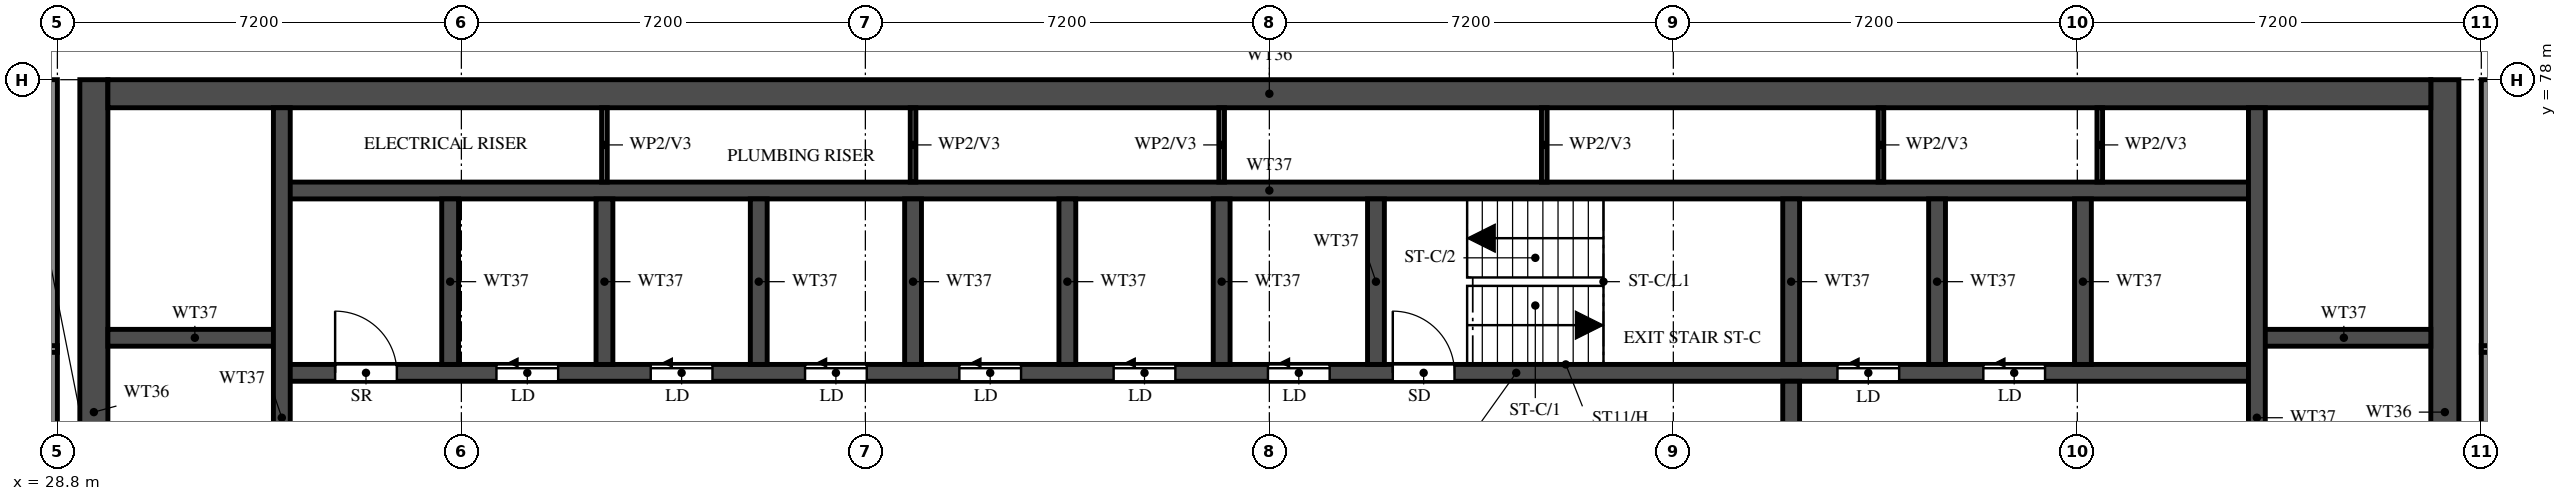
"""IFC4 building model, lengths in metres.
Left out: names, types, materials, properties, quantities, classifications, styles, units other than length and angle.
Written with IfcOpenShell. Run it as: python <this file> out.ifc"""

import sys

from ifc_helpers import new_model, si_unit, direction, frame, frame_2d, origin, place, context, subcontext, project, spatial, rectangle, extrude, element, fill, save


model = new_model("IFC4")
c1 = context("Model", 3, precision=1e-05, world=origin(), true_north=direction((0.0, 1.0)))
c2 = subcontext(c1, "Body", "Model", "MODEL_VIEW")
j1 = project(units=[si_unit("LENGTHUNIT", "METRE"), si_unit("PLANEANGLEUNIT", "RADIAN")], contexts=[c1])
p1 = place(None, origin())
s1 = spatial("IfcSite", under=j1, at=p1, CompositionType="ELEMENT")
p2 = place(p1, origin())
s2 = spatial("IfcBuilding", under=s1, at=p2, CompositionType="ELEMENT")
p3 = place(p2, frame((0.0, 0.0, 260.5)))
s3 = spatial("IfcBuildingStorey", under=s2, at=p3, CompositionType="ELEMENT", Elevation=260.5)
for number, where, z_axis, x_axis in (
    (1, (29.45, 66.15, 0.0), (0.0, 0.0, 1.0), (0.0, 1.0, 0.0)),
    (2, (71.35, 66.15, 0.0), (0.0, 0.0, 1.0), (0.0, 1.0, 0.0)),
):
    element("IfcWall", number, at=place(p3, frame(where, z_axis=z_axis, x_axis=x_axis)), inside=s3, PredefinedType="SHEAR", context=c2, shape_type="SweptSolid", body=[
        extrude(rectangle(XDim=11.85, YDim=0.5, at=frame_2d((5.925, 0.0))), origin(), (0.0, 0.0, 1.0), 3.22),
    ])
p4 = place(p3, frame((29.7, 77.75, 0.0), z_axis=(0.0, 0.0, 1.0), x_axis=(1.0, 0.0, 0.0)))
e3 = element("IfcWall", 3, at=p4, inside=s3, PredefinedType="SHEAR", context=c2, shape_type="SweptSolid", body=[
    extrude(rectangle(XDim=41.4, YDim=0.5, at=frame_2d((20.7, 0.0))), origin(), (0.0, 0.0, 1.0), 3.22),
])
p5 = place(p3, frame((32.8, 72.775, 0.0), z_axis=(0.0, 0.0, 1.0), x_axis=(1.0, 0.0, 0.0)))
e4 = element("IfcWall", 4, at=p5, inside=s3, PredefinedType="SHEAR", context=c2, shape_type="SweptSolid", body=[
    extrude(rectangle(XDim=35.2, YDim=0.3, at=frame_2d((17.6, 0.0))), origin(), (0.0, 0.0, 1.0), 3.22),
])
p6 = place(p5, frame((19.8, 0.0, 0.0)))
e5 = element("IfcOpeningElement", 5, at=p6, cuts=e4, PredefinedType="OPENING", context=c2, shape_type="SweptSolid", body=[
    extrude(rectangle(XDim=1.1, YDim=2.1, at=frame_2d((0.55, 1.05))), frame((0.0, 0.16, 0.0), z_axis=(0.0, -1.0, 0.0), x_axis=(1.0, 0.0, 0.0)), (0.0, 0.0, 1.0), 0.32),
])
p7 = place(p5, frame((27.725, 0.0, 0.0)))
e6 = element("IfcOpeningElement", 6, at=p7, cuts=e4, PredefinedType="OPENING", context=c2, shape_type="SweptSolid", body=[
    extrude(rectangle(XDim=1.1, YDim=2.1, at=frame_2d((0.55, 1.05))), frame((0.0, 0.16, 0.0), z_axis=(0.0, -1.0, 0.0), x_axis=(1.0, 0.0, 0.0)), (0.0, 0.0, 1.0), 0.32),
])
p8 = place(p5, frame((30.325, 0.0, 0.0)))
e7 = element("IfcOpeningElement", 7, at=p8, cuts=e4, PredefinedType="OPENING", context=c2, shape_type="SweptSolid", body=[
    extrude(rectangle(XDim=1.1, YDim=2.1, at=frame_2d((0.55, 1.05))), frame((0.0, 0.16, 0.0), z_axis=(0.0, -1.0, 0.0), x_axis=(1.0, 0.0, 0.0)), (0.0, 0.0, 1.0), 0.32),
])
p9 = place(p5, frame((3.825, 0.0, 0.0)))
e8 = element("IfcOpeningElement", 8, at=p9, cuts=e4, PredefinedType="OPENING", context=c2, shape_type="SweptSolid", body=[
    extrude(rectangle(XDim=1.1, YDim=2.1, at=frame_2d((0.55, 1.05))), frame((0.0, 0.16, 0.0), z_axis=(0.0, -1.0, 0.0), x_axis=(1.0, 0.0, 0.0)), (0.0, 0.0, 1.0), 0.32),
])
p10 = place(p5, frame((6.575, 0.0, 0.0)))
e9 = element("IfcOpeningElement", 9, at=p10, cuts=e4, PredefinedType="OPENING", context=c2, shape_type="SweptSolid", body=[
    extrude(rectangle(XDim=1.1, YDim=2.1, at=frame_2d((0.55, 1.05))), frame((0.0, 0.16, 0.0), z_axis=(0.0, -1.0, 0.0), x_axis=(1.0, 0.0, 0.0)), (0.0, 0.0, 1.0), 0.32),
])
p11 = place(p5, frame((9.325, 0.0, 0.0)))
e10 = element("IfcOpeningElement", 10, at=p11, cuts=e4, PredefinedType="OPENING", context=c2, shape_type="SweptSolid", body=[
    extrude(rectangle(XDim=1.1, YDim=2.1, at=frame_2d((0.55, 1.05))), frame((0.0, 0.16, 0.0), z_axis=(0.0, -1.0, 0.0), x_axis=(1.0, 0.0, 0.0)), (0.0, 0.0, 1.0), 0.32),
])
p12 = place(p5, frame((12.075, 0.0, 0.0)))
e11 = element("IfcOpeningElement", 11, at=p12, cuts=e4, PredefinedType="OPENING", context=c2, shape_type="SweptSolid", body=[
    extrude(rectangle(XDim=1.1, YDim=2.1, at=frame_2d((0.55, 1.05))), frame((0.0, 0.16, 0.0), z_axis=(0.0, -1.0, 0.0), x_axis=(1.0, 0.0, 0.0)), (0.0, 0.0, 1.0), 0.32),
])
p13 = place(p5, frame((14.825, 0.0, 0.0)))
e12 = element("IfcOpeningElement", 12, at=p13, cuts=e4, PredefinedType="OPENING", context=c2, shape_type="SweptSolid", body=[
    extrude(rectangle(XDim=1.1, YDim=2.1, at=frame_2d((0.55, 1.05))), frame((0.0, 0.16, 0.0), z_axis=(0.0, -1.0, 0.0), x_axis=(1.0, 0.0, 0.0)), (0.0, 0.0, 1.0), 0.32),
])
p14 = place(p5, frame((17.575, 0.0, 0.0)))
e13 = element("IfcOpeningElement", 13, at=p14, cuts=e4, PredefinedType="OPENING", context=c2, shape_type="SweptSolid", body=[
    extrude(rectangle(XDim=1.1, YDim=2.1, at=frame_2d((0.55, 1.05))), frame((0.0, 0.16, 0.0), z_axis=(0.0, -1.0, 0.0), x_axis=(1.0, 0.0, 0.0)), (0.0, 0.0, 1.0), 0.32),
])
p15 = place(p5, frame((0.95, 0.0, 0.0)))
e14 = element("IfcOpeningElement", 14, at=p15, cuts=e4, PredefinedType="OPENING", context=c2, shape_type="SweptSolid", body=[
    extrude(rectangle(XDim=1.1, YDim=2.1, at=frame_2d((0.55, 1.05))), frame((0.0, 0.16, 0.0), z_axis=(0.0, -1.0, 0.0), x_axis=(1.0, 0.0, 0.0)), (0.0, 0.0, 1.0), 0.32),
])
p16 = place(p3, frame((32.8, 76.025, 0.0), z_axis=(0.0, 0.0, 1.0), x_axis=(1.0, 0.0, 0.0)))
e15 = element("IfcWall", 15, at=p16, inside=s3, PredefinedType="SHEAR", context=c2, shape_type="SweptSolid", body=[
    extrude(rectangle(XDim=35.2, YDim=0.3, at=frame_2d((17.6, 0.0))), origin(), (0.0, 0.0, 1.0), 3.22),
])
for number, where, z_axis, x_axis in (
    (16, (29.7, 73.4, 0.0), (0.0, 0.0, 1.0), (1.0, 0.0, 0.0)),
    (17, (68.0, 73.4, 0.0), (0.0, 0.0, 1.0), (1.0, 0.0, 0.0)),
):
    element("IfcWall", number, at=place(p3, frame(where, z_axis=z_axis, x_axis=x_axis)), inside=s3, PredefinedType="SHEAR", context=c2, shape_type="SweptSolid", body=[
        extrude(rectangle(XDim=3.1, YDim=0.3, at=frame_2d((1.55, 0.0))), origin(), (0.0, 0.0, 1.0), 3.22),
    ])
p17 = place(p3, frame((32.8, 66.45, 0.0), z_axis=(0.0, 0.0, 1.0), x_axis=(0.0, 1.0, 0.0)))
e18 = element("IfcWall", 18, at=p17, inside=s3, PredefinedType="SHEAR", context=c2, shape_type="SweptSolid", body=[
    extrude(rectangle(XDim=11.05, YDim=0.3, at=frame_2d((5.525, 0.0))), origin(), (0.0, 0.0, 1.0), 3.22),
])
p18 = place(p3, frame((68.0, 66.45, 0.0), z_axis=(0.0, 0.0, 1.0), x_axis=(0.0, 1.0, 0.0)))
e19 = element("IfcWall", 19, at=p18, inside=s3, PredefinedType="SHEAR", context=c2, shape_type="SweptSolid", body=[
    extrude(rectangle(XDim=11.05, YDim=0.3, at=frame_2d((5.525, 0.0))), origin(), (0.0, 0.0, 1.0), 3.22),
])
p19 = place(p18, frame((0.15, 0.0, 0.0)))
e20 = element("IfcOpeningElement", 20, at=p19, cuts=e19, PredefinedType="OPENING", context=c2, shape_type="SweptSolid", body=[
    extrude(rectangle(XDim=1.1, YDim=2.1, at=frame_2d((0.55, 1.05))), frame((0.0, 0.16, 0.0), z_axis=(0.0, -1.0, 0.0), x_axis=(1.0, 0.0, 0.0)), (0.0, 0.0, 1.0), 0.32),
])
p20 = place(p3, frame((59.7, 66.45, 0.0), z_axis=(0.0, 0.0, 1.0), x_axis=(0.0, 1.0, 0.0)))
e21 = element("IfcWall", 21, at=p20, inside=s3, PredefinedType="SHEAR", context=c2, shape_type="SweptSolid", body=[
    extrude(rectangle(XDim=6.175, YDim=0.3, at=frame_2d((3.087, 0.0))), origin(), (0.0, 0.0, 1.0), 3.22),
])
p21 = place(p20, frame((3.85, 0.0, 0.0)))
e22 = element("IfcOpeningElement", 22, at=p21, cuts=e21, PredefinedType="OPENING", context=c2, shape_type="SweptSolid", body=[
    extrude(rectangle(XDim=1.2, YDim=2.1, at=frame_2d((0.6, 1.05))), frame((0.0, 0.16, 0.0), z_axis=(0.0, -1.0, 0.0), x_axis=(1.0, 0.0, 0.0)), (0.0, 0.0, 1.0), 0.32),
])
for number, where, z_axis, x_axis in (
    (23, (59.7, 72.925, 0.0), (0.0, 0.0, 1.0), (0.0, 1.0, 0.0)),
    (24, (35.8, 72.925, 0.0), (0.0, 0.0, 1.0), (0.0, 1.0, 0.0)),
    (25, (38.55, 72.925, 0.0), (0.0, 0.0, 1.0), (0.0, 1.0, 0.0)),
    (26, (41.3, 72.925, 0.0), (0.0, 0.0, 1.0), (0.0, 1.0, 0.0)),
    (27, (44.05, 72.925, 0.0), (0.0, 0.0, 1.0), (0.0, 1.0, 0.0)),
    (28, (46.8, 72.925, 0.0), (0.0, 0.0, 1.0), (0.0, 1.0, 0.0)),
    (29, (49.55, 72.925, 0.0), (0.0, 0.0, 1.0), (0.0, 1.0, 0.0)),
    (30, (52.3, 72.925, 0.0), (0.0, 0.0, 1.0), (0.0, 1.0, 0.0)),
    (31, (62.3, 72.925, 0.0), (0.0, 0.0, 1.0), (0.0, 1.0, 0.0)),
    (32, (64.9, 72.925, 0.0), (0.0, 0.0, 1.0), (0.0, 1.0, 0.0)),
):
    element("IfcWall", number, at=place(p3, frame(where, z_axis=z_axis, x_axis=x_axis)), inside=s3, PredefinedType="SHEAR", context=c2, shape_type="SweptSolid", body=[
        extrude(rectangle(XDim=2.95, YDim=0.3, at=frame_2d((1.475, 0.0))), origin(), (0.0, 0.0, 1.0), 3.22),
    ])
for number, where, z_axis, x_axis in (
    (33, (38.55, 76.175, 0.0), (0.0, 0.0, 1.0), (0.0, 1.0, 0.0)),
    (34, (44.05, 76.175, 0.0), (0.0, 0.0, 1.0), (0.0, 1.0, 0.0)),
    (35, (49.55, 76.175, 0.0), (0.0, 0.0, 1.0), (0.0, 1.0, 0.0)),
    (36, (55.3, 76.175, 0.0), (0.0, 0.0, 1.0), (0.0, 1.0, 0.0)),
    (37, (61.3, 76.175, 0.0), (0.0, 0.0, 1.0), (0.0, 1.0, 0.0)),
    (38, (65.2, 76.175, 0.0), (0.0, 0.0, 1.0), (0.0, 1.0, 0.0)),
):
    element("IfcWall", number, at=place(p3, frame(where, z_axis=z_axis, x_axis=x_axis)), inside=s3, PredefinedType="PARTITIONING", context=c2, shape_type="SweptSolid", body=[
        extrude(rectangle(XDim=1.325, YDim=0.1, at=frame_2d((0.663, 0.0))), origin(), (0.0, 0.0, 1.0), 3.22),
    ])
for number, where, z_axis, x_axis in (
    (39, (28.7, 62.4, 0.0), (0.0, 0.0, 1.0), (0.0, 1.0, 0.0)),
    (40, (72.1, 62.4, 0.0), (0.0, 0.0, 1.0), (0.0, 1.0, 0.0)),
):
    element("IfcWall", number, at=place(p3, frame(where, z_axis=z_axis, x_axis=x_axis)), inside=s3, PredefinedType="SOLIDWALL", context=c2, shape_type="SweptSolid", body=[
        extrude(rectangle(XDim=15.6, YDim=0.2, at=frame_2d((7.8, 0.0))), origin(), (0.0, 0.0, 1.0), 3.22),
    ])
p22 = place(p3, frame((18.525, 73.2, 0.0), z_axis=(0.0, 0.0, 1.0), x_axis=(1.0, 0.0, 0.0)))
e41 = element("IfcWall", 41, at=p22, inside=s3, PredefinedType="PARTITIONING", context=c2, shape_type="SweptSolid", body=[
    extrude(rectangle(XDim=10.275, YDim=0.12, at=frame_2d((5.138, 0.0))), origin(), (0.0, 0.0, 1.0), 2.32),
])
p23 = place(p22, frame((5.275, 0.0, 0.0)))
e42 = element("IfcOpeningElement", 42, at=p23, cuts=e41, PredefinedType="OPENING", context=c2, shape_type="SweptSolid", body=[
    extrude(rectangle(XDim=0.9, YDim=2.1, at=frame_2d((0.45, 1.05))), frame((0.0, 0.07, 0.0), z_axis=(0.0, -1.0, 0.0), x_axis=(1.0, 0.0, 0.0)), (0.0, 0.0, 1.0), 0.14),
])
p24 = place(p3, frame((72.0, 73.2, 0.0), z_axis=(0.0, 0.0, 1.0), x_axis=(1.0, 0.0, 0.0)))
e43 = element("IfcWall", 43, at=p24, inside=s3, PredefinedType="PARTITIONING", context=c2, shape_type="SweptSolid", body=[
    extrude(rectangle(XDim=10.275, YDim=0.12, at=frame_2d((5.137, 0.0))), origin(), (0.0, 0.0, 1.0), 2.32),
])
p25 = place(p24, frame((4.1, 0.0, 0.0)))
e44 = element("IfcOpeningElement", 44, at=p25, cuts=e43, PredefinedType="OPENING", context=c2, shape_type="SweptSolid", body=[
    extrude(rectangle(XDim=0.9, YDim=2.1, at=frame_2d((0.45, 1.05))), frame((0.0, 0.07, 0.0), z_axis=(0.0, -1.0, 0.0), x_axis=(1.0, 0.0, 0.0)), (0.0, 0.0, 1.0), 0.14),
])
p26 = place(p6, origin())
e45 = element("IfcDoor", 45, at=p26, inside=s3, OperationType="SINGLE_SWING_LEFT", PredefinedType="DOOR", context=c2, shape_type="SweptSolid", body=[
    extrude(rectangle(XDim=1.1, YDim=2.1, at=frame_2d((0.55, 1.05))), frame((0.0, 0.025, 0.0), z_axis=(0.0, -1.0, 0.0), x_axis=(1.0, 0.0, 0.0)), (0.0, 0.0, 1.0), 0.05),
])
fill(e5, e45)
p27 = place(p7, origin())
e46 = element("IfcDoor", 46, at=p27, inside=s3, OperationType="SLIDING_TO_LEFT", PredefinedType="DOOR", context=c2, shape_type="SweptSolid", body=[
    extrude(rectangle(XDim=1.1, YDim=2.1, at=frame_2d((0.55, 1.05))), frame((0.0, 0.025, 0.0), z_axis=(0.0, -1.0, 0.0), x_axis=(1.0, 0.0, 0.0)), (0.0, 0.0, 1.0), 0.05),
])
fill(e6, e46)
p28 = place(p8, origin())
e47 = element("IfcDoor", 47, at=p28, inside=s3, OperationType="SLIDING_TO_LEFT", PredefinedType="DOOR", context=c2, shape_type="SweptSolid", body=[
    extrude(rectangle(XDim=1.1, YDim=2.1, at=frame_2d((0.55, 1.05))), frame((0.0, 0.025, 0.0), z_axis=(0.0, -1.0, 0.0), x_axis=(1.0, 0.0, 0.0)), (0.0, 0.0, 1.0), 0.05),
])
fill(e7, e47)
p29 = place(p9, origin())
e48 = element("IfcDoor", 48, at=p29, inside=s3, OperationType="SLIDING_TO_LEFT", PredefinedType="DOOR", context=c2, shape_type="SweptSolid", body=[
    extrude(rectangle(XDim=1.1, YDim=2.1, at=frame_2d((0.55, 1.05))), frame((0.0, 0.025, 0.0), z_axis=(0.0, -1.0, 0.0), x_axis=(1.0, 0.0, 0.0)), (0.0, 0.0, 1.0), 0.05),
])
fill(e8, e48)
p30 = place(p10, origin())
e49 = element("IfcDoor", 49, at=p30, inside=s3, OperationType="SLIDING_TO_LEFT", PredefinedType="DOOR", context=c2, shape_type="SweptSolid", body=[
    extrude(rectangle(XDim=1.1, YDim=2.1, at=frame_2d((0.55, 1.05))), frame((0.0, 0.025, 0.0), z_axis=(0.0, -1.0, 0.0), x_axis=(1.0, 0.0, 0.0)), (0.0, 0.0, 1.0), 0.05),
])
fill(e9, e49)
p31 = place(p11, origin())
e50 = element("IfcDoor", 50, at=p31, inside=s3, OperationType="SLIDING_TO_LEFT", PredefinedType="DOOR", context=c2, shape_type="SweptSolid", body=[
    extrude(rectangle(XDim=1.1, YDim=2.1, at=frame_2d((0.55, 1.05))), frame((0.0, 0.025, 0.0), z_axis=(0.0, -1.0, 0.0), x_axis=(1.0, 0.0, 0.0)), (0.0, 0.0, 1.0), 0.05),
])
fill(e10, e50)
p32 = place(p12, origin())
e51 = element("IfcDoor", 51, at=p32, inside=s3, OperationType="SLIDING_TO_LEFT", PredefinedType="DOOR", context=c2, shape_type="SweptSolid", body=[
    extrude(rectangle(XDim=1.1, YDim=2.1, at=frame_2d((0.55, 1.05))), frame((0.0, 0.025, 0.0), z_axis=(0.0, -1.0, 0.0), x_axis=(1.0, 0.0, 0.0)), (0.0, 0.0, 1.0), 0.05),
])
fill(e11, e51)
p33 = place(p13, origin())
e52 = element("IfcDoor", 52, at=p33, inside=s3, OperationType="SLIDING_TO_LEFT", PredefinedType="DOOR", context=c2, shape_type="SweptSolid", body=[
    extrude(rectangle(XDim=1.1, YDim=2.1, at=frame_2d((0.55, 1.05))), frame((0.0, 0.025, 0.0), z_axis=(0.0, -1.0, 0.0), x_axis=(1.0, 0.0, 0.0)), (0.0, 0.0, 1.0), 0.05),
])
fill(e12, e52)
p34 = place(p14, origin())
e53 = element("IfcDoor", 53, at=p34, inside=s3, OperationType="SLIDING_TO_LEFT", PredefinedType="DOOR", context=c2, shape_type="SweptSolid", body=[
    extrude(rectangle(XDim=1.1, YDim=2.1, at=frame_2d((0.55, 1.05))), frame((0.0, 0.025, 0.0), z_axis=(0.0, -1.0, 0.0), x_axis=(1.0, 0.0, 0.0)), (0.0, 0.0, 1.0), 0.05),
])
fill(e13, e53)
p35 = place(p15, origin())
e54 = element("IfcDoor", 54, at=p35, inside=s3, OperationType="SINGLE_SWING_LEFT", PredefinedType="DOOR", context=c2, shape_type="SweptSolid", body=[
    extrude(rectangle(XDim=1.1, YDim=2.1, at=frame_2d((0.55, 1.05))), frame((0.0, 0.025, 0.0), z_axis=(0.0, -1.0, 0.0), x_axis=(1.0, 0.0, 0.0)), (0.0, 0.0, 1.0), 0.05),
])
fill(e14, e54)
save(model, sys.argv[1])
